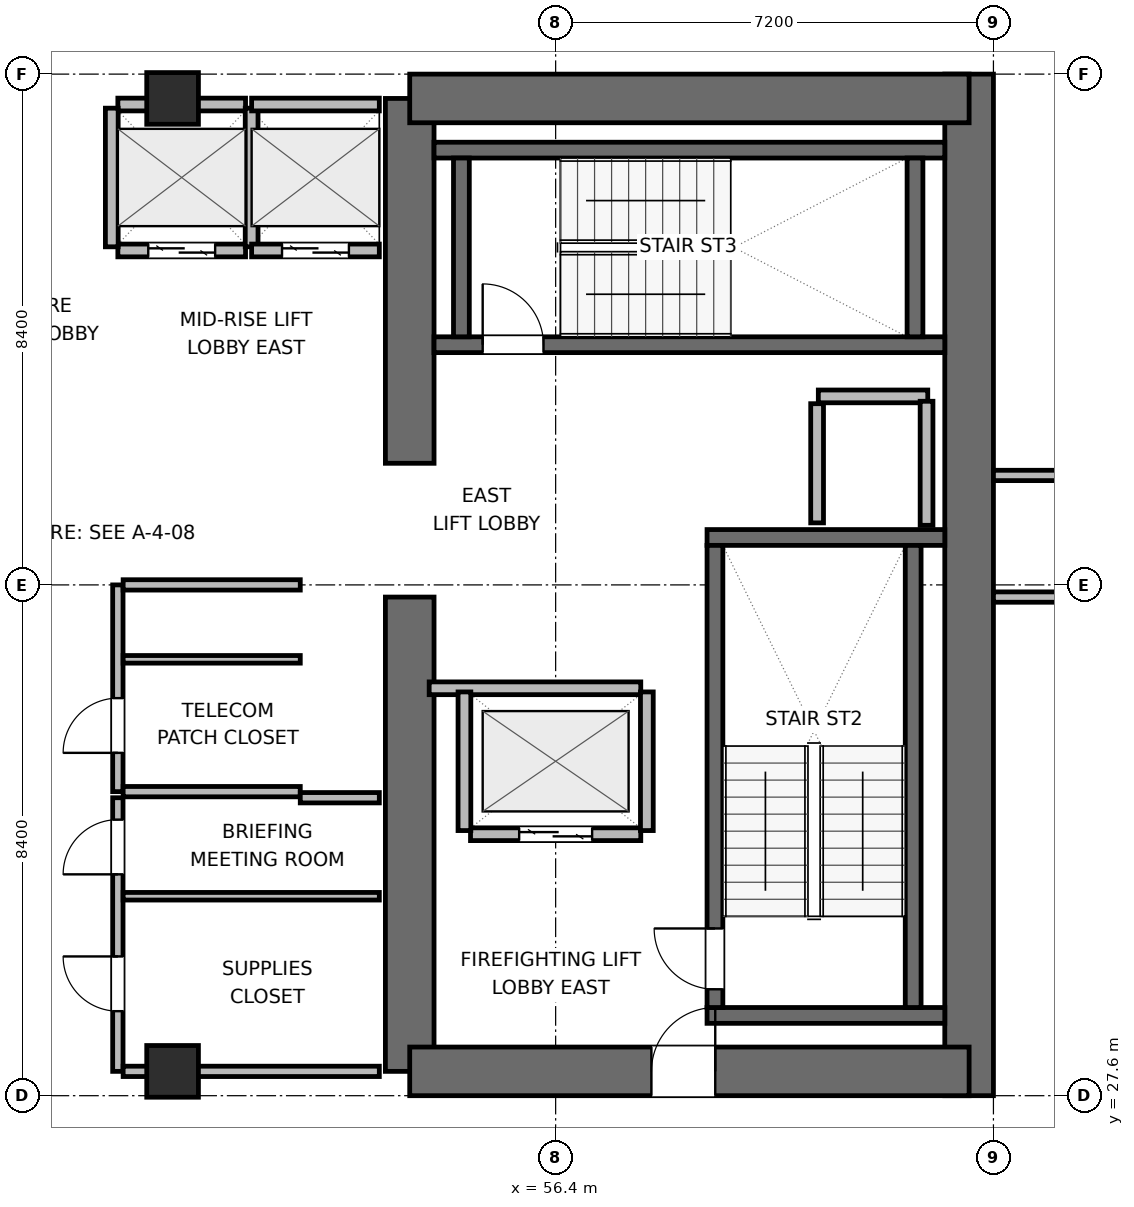
"""IFC4 building model, lengths in metres.
Left out: names, types, materials, properties, quantities, classifications, styles, units other than length and angle.
Written with IfcOpenShell. Run it as: python <this file> out.ifc"""

import sys

from ifc_helpers import new_model, si_unit, direction, frame, frame_2d, origin, origin_2d, place, context, subcontext, project, spatial, rectangle, extrude, element, fill, save


model = new_model("IFC4")
c1 = context("Model", 3, precision=1e-05, world=origin(), true_north=direction((0.0, 1.0)))
c2 = subcontext(c1, "Body", "Model", "MODEL_VIEW")
j1 = project(units=[si_unit("LENGTHUNIT", "METRE"), si_unit("PLANEANGLEUNIT", "RADIAN")], contexts=[c1])
p1 = place(None, origin())
s1 = spatial("IfcSite", under=j1, at=p1, CompositionType="ELEMENT")
p2 = place(p1, origin())
s2 = spatial("IfcBuilding", under=s1, at=p2, CompositionType="ELEMENT")
p3 = place(p2, frame((0.0, 0.0, 162.3)))
s3 = spatial("IfcBuildingStorey", under=s2, at=p3, CompositionType="ELEMENT", Elevation=162.3)
p4 = place(p3, frame((54.0, 28.0, 0.0), z_axis=(0.0, 0.0, 1.0), x_axis=(0.0, 1.0, 0.0)))
e1 = element("IfcWall", 1, at=p4, inside=s3, PredefinedType="SHEAR", context=c2, shape_type="SweptSolid", body=[
    extrude(rectangle(XDim=7.8, YDim=0.8, at=frame_2d((3.9, 0.0))), origin(), (0.0, 0.0, 1.0), 3.9),
])
p5 = place(p3, frame((54.0, 38.0, 0.0), z_axis=(0.0, 0.0, 1.0), x_axis=(0.0, 1.0, 0.0)))
e2 = element("IfcWall", 2, at=p5, inside=s3, PredefinedType="SHEAR", context=c2, shape_type="SweptSolid", body=[
    extrude(rectangle(XDim=6.0, YDim=0.8, at=frame_2d((3.0, 0.0))), origin(), (0.0, 0.0, 1.0), 3.9),
])
p6 = place(p3, frame((63.2, 27.6, 0.0), z_axis=(0.0, 0.0, 1.0), x_axis=(0.0, 1.0, 0.0)))
e3 = element("IfcWall", 3, at=p6, inside=s3, PredefinedType="SHEAR", context=c2, shape_type="SweptSolid", body=[
    extrude(rectangle(XDim=16.8, YDim=0.8, at=frame_2d((8.4, 0.0))), origin(), (0.0, 0.0, 1.0), 3.9),
])
p7 = place(p3, frame((54.0, 28.0, 0.0), z_axis=(0.0, 0.0, 1.0), x_axis=(1.0, 0.0, 0.0)))
e4 = element("IfcWall", 4, at=p7, inside=s3, PredefinedType="SHEAR", context=c2, shape_type="SweptSolid", body=[
    extrude(rectangle(XDim=9.2, YDim=0.8, at=frame_2d((4.6, 0.0))), origin(), (0.0, 0.0, 1.0), 3.9),
])
p8 = place(p7, frame((3.975, 0.0, 0.0)))
e5 = element("IfcOpeningElement", 5, at=p8, cuts=e4, PredefinedType="OPENING", context=c2, shape_type="SweptSolid", body=[
    extrude(rectangle(XDim=1.05, YDim=2.04, at=frame_2d((0.525, 1.02))), frame((0.0, 0.41, 0.0), z_axis=(0.0, -1.0, 0.0), x_axis=(1.0, 0.0, 0.0)), (0.0, 0.0, 1.0), 0.82),
])
p9 = place(p3, frame((54.0, 44.0, 0.0), z_axis=(0.0, 0.0, 1.0), x_axis=(1.0, 0.0, 0.0)))
e6 = element("IfcWall", 6, at=p9, inside=s3, PredefinedType="SHEAR", context=c2, shape_type="SweptSolid", body=[
    extrude(rectangle(XDim=9.2, YDim=0.8, at=frame_2d((4.6, 0.0))), origin(), (0.0, 0.0, 1.0), 3.9),
])
for number, where, z_axis, x_axis in (
    (7, (58.89, 28.92, 0.0), (0.0, 0.0, 1.0), (1.0, 0.0, 0.0)),
    (8, (58.89, 36.78, 0.0), (0.0, 0.0, 1.0), (1.0, 0.0, 0.0)),
):
    element("IfcWall", number, at=place(p3, frame(where, z_axis=z_axis, x_axis=x_axis)), inside=s3, PredefinedType="SHEAR", context=c2, shape_type="SweptSolid", body=[
        extrude(rectangle(XDim=3.91, YDim=0.26, at=frame_2d((1.955, 0.0))), origin(), (0.0, 0.0, 1.0), 3.9),
    ])
p10 = place(p3, frame((59.02, 29.05, 0.0), z_axis=(0.0, 0.0, 1.0), x_axis=(0.0, 1.0, 0.0)))
e9 = element("IfcWall", 9, at=p10, inside=s3, PredefinedType="SHEAR", context=c2, shape_type="SweptSolid", body=[
    extrude(rectangle(XDim=7.6, YDim=0.26, at=frame_2d((3.8, 0.0))), origin(), (0.0, 0.0, 1.0), 3.9),
])
p11 = place(p10, frame((0.3, 0.0, 0.0)))
e10 = element("IfcOpeningElement", 10, at=p11, cuts=e9, PredefinedType="OPENING", context=c2, shape_type="SweptSolid", body=[
    extrude(rectangle(XDim=1.0, YDim=2.04, at=frame_2d((0.5, 1.02))), frame((0.0, 0.14, 0.0), z_axis=(0.0, -1.0, 0.0), x_axis=(1.0, 0.0, 0.0)), (0.0, 0.0, 1.0), 0.28),
])
p12 = place(p3, frame((62.28, 29.05, 0.0), z_axis=(0.0, 0.0, 1.0), x_axis=(0.0, 1.0, 0.0)))
e11 = element("IfcWall", 11, at=p12, inside=s3, PredefinedType="SHEAR", context=c2, shape_type="SweptSolid", body=[
    extrude(rectangle(XDim=7.6, YDim=0.26, at=frame_2d((3.8, 0.0))), origin(), (0.0, 0.0, 1.0), 3.9),
])
p13 = place(p3, frame((54.4, 39.95, 0.0), z_axis=(0.0, 0.0, 1.0), x_axis=(1.0, 0.0, 0.0)))
e12 = element("IfcWall", 12, at=p13, inside=s3, PredefinedType="SHEAR", context=c2, shape_type="SweptSolid", body=[
    extrude(rectangle(XDim=8.4, YDim=0.26, at=frame_2d((4.2, 0.0))), origin(), (0.0, 0.0, 1.0), 3.9),
])
p14 = place(p13, frame((0.8, 0.0, 0.0)))
e13 = element("IfcOpeningElement", 13, at=p14, cuts=e12, PredefinedType="OPENING", context=c2, shape_type="SweptSolid", body=[
    extrude(rectangle(XDim=1.0, YDim=2.04, at=frame_2d((0.5, 1.02))), frame((0.0, 0.14, 0.0), z_axis=(0.0, -1.0, 0.0), x_axis=(1.0, 0.0, 0.0)), (0.0, 0.0, 1.0), 0.28),
])
p15 = place(p3, frame((54.4, 43.15, 0.0), z_axis=(0.0, 0.0, 1.0), x_axis=(1.0, 0.0, 0.0)))
e14 = element("IfcWall", 14, at=p15, inside=s3, PredefinedType="SHEAR", context=c2, shape_type="SweptSolid", body=[
    extrude(rectangle(XDim=8.4, YDim=0.26, at=frame_2d((4.2, 0.0))), origin(), (0.0, 0.0, 1.0), 3.9),
])
for number, where, z_axis, x_axis in (
    (15, (54.85, 40.08, 0.0), (0.0, 0.0, 1.0), (0.0, 1.0, 0.0)),
    (16, (62.31, 40.08, 0.0), (0.0, 0.0, 1.0), (0.0, 1.0, 0.0)),
):
    element("IfcWall", number, at=place(p3, frame(where, z_axis=z_axis, x_axis=x_axis)), inside=s3, PredefinedType="SHEAR", context=c2, shape_type="SweptSolid", body=[
        extrude(rectangle(XDim=2.94, YDim=0.26, at=frame_2d((1.47, 0.0))), origin(), (0.0, 0.0, 1.0), 3.9),
    ])
for number, where, z_axis, x_axis in (
    (17, (50.1, 28.0, 0.0), (0.0, 0.0, 1.0), (1.0, 0.0, 0.0)),
    (18, (50.1, 44.0, 0.0), (0.0, 0.0, 1.0), (1.0, 0.0, 0.0)),
):
    element("IfcColumn", number, at=place(p3, frame(where, z_axis=z_axis, x_axis=x_axis)), inside=s3, PredefinedType="COLUMN", context=c2, shape_type="SweptSolid", body=[
        extrude(rectangle(XDim=0.85, YDim=0.85, at=origin_2d()), origin(), (0.0, 0.0, 1.0), 3.9),
    ])
p16 = place(p3, frame((60.72, 39.1, 0.0), z_axis=(0.0, 0.0, 1.0), x_axis=(1.0, 0.0, 0.0)))
e19 = element("IfcWall", 19, at=p16, inside=s3, PredefinedType="PARTITIONING", context=c2, shape_type="SweptSolid", body=[
    extrude(rectangle(XDim=1.8, YDim=0.21, at=frame_2d((0.9, 0.0))), origin(), (0.0, 0.0, 1.0), 3.68),
])
p17 = place(p3, frame((60.7, 37.02, 0.0), z_axis=(0.0, 0.0, 1.0), x_axis=(0.0, 1.0, 0.0)))
e20 = element("IfcWall", 20, at=p17, inside=s3, PredefinedType="PARTITIONING", context=c2, shape_type="SweptSolid", body=[
    extrude(rectangle(XDim=1.96, YDim=0.21, at=frame_2d((0.98, 0.0))), origin(), (0.0, 0.0, 1.0), 3.68),
])
p18 = place(p3, frame((62.5, 36.98, 0.0), z_axis=(0.0, 0.0, 1.0), x_axis=(0.0, 1.0, 0.0)))
e21 = element("IfcWall", 21, at=p18, inside=s3, PredefinedType="PARTITIONING", context=c2, shape_type="SweptSolid", body=[
    extrude(rectangle(XDim=2.04, YDim=0.21, at=frame_2d((1.02, 0.0))), origin(), (0.0, 0.0, 1.0), 3.68),
])
p19 = place(p3, frame((55.0, 31.9, 0.0), z_axis=(0.0, 0.0, 1.0), x_axis=(1.0, 0.0, 0.0)))
e22 = element("IfcWall", 22, at=p19, inside=s3, PredefinedType="PARTITIONING", context=c2, shape_type="SweptSolid", body=[
    extrude(rectangle(XDim=2.8, YDim=0.21, at=frame_2d((1.4, 0.0))), origin(), (0.0, 0.0, 1.0), 3.68),
])
p20 = place(p19, frame((0.8, 0.0, 0.0)))
e23 = element("IfcOpeningElement", 23, at=p20, cuts=e22, PredefinedType="OPENING", context=c2, shape_type="SweptSolid", body=[
    extrude(rectangle(XDim=1.2, YDim=2.04, at=frame_2d((0.6, 1.02))), frame((0.0, 0.115, 0.0), z_axis=(0.0, -1.0, 0.0), x_axis=(1.0, 0.0, 0.0)), (0.0, 0.0, 1.0), 0.23),
])
p21 = place(p3, frame((54.32, 34.3, 0.0), z_axis=(0.0, 0.0, 1.0), x_axis=(1.0, 0.0, 0.0)))
e24 = element("IfcWall", 24, at=p21, inside=s3, PredefinedType="PARTITIONING", context=c2, shape_type="SweptSolid", body=[
    extrude(rectangle(XDim=3.48, YDim=0.21, at=frame_2d((1.74, 0.0))), origin(), (0.0, 0.0, 1.0), 3.68),
])
for number, where, z_axis, x_axis in (
    (25, (54.9, 31.96, 0.0), (0.0, 0.0, 1.0), (0.0, 1.0, 0.0)),
    (26, (57.9, 31.96, 0.0), (0.0, 0.0, 1.0), (0.0, 1.0, 0.0)),
):
    element("IfcWall", number, at=place(p3, frame(where, z_axis=z_axis, x_axis=x_axis)), inside=s3, PredefinedType="PARTITIONING", context=c2, shape_type="SweptSolid", body=[
        extrude(rectangle(XDim=2.28, YDim=0.21, at=frame_2d((1.14, 0.0))), origin(), (0.0, 0.0, 1.0), 3.68),
    ])
p22 = place(p3, frame((49.2, 41.5, 0.0), z_axis=(0.0, 0.0, 1.0), x_axis=(1.0, 0.0, 0.0)))
e27 = element("IfcWall", 27, at=p22, inside=s3, PredefinedType="PARTITIONING", context=c2, shape_type="SweptSolid", body=[
    extrude(rectangle(XDim=2.1, YDim=0.21, at=frame_2d((1.05, 0.0))), origin(), (0.0, 0.0, 1.0), 3.68),
])
p23 = place(p22, frame((0.5, 0.0, 0.0)))
e28 = element("IfcOpeningElement", 28, at=p23, cuts=e27, PredefinedType="OPENING", context=c2, shape_type="SweptSolid", body=[
    extrude(rectangle(XDim=1.1, YDim=2.04, at=frame_2d((0.55, 1.02))), frame((0.0, 0.115, 0.0), z_axis=(0.0, -1.0, 0.0), x_axis=(1.0, 0.0, 0.0)), (0.0, 0.0, 1.0), 0.23),
])
p24 = place(p3, frame((49.2, 43.9, 0.0), z_axis=(0.0, 0.0, 1.0), x_axis=(1.0, 0.0, 0.0)))
e29 = element("IfcWall", 29, at=p24, inside=s3, PredefinedType="PARTITIONING", context=c2, shape_type="SweptSolid", body=[
    extrude(rectangle(XDim=2.1, YDim=0.21, at=frame_2d((1.05, 0.0))), origin(), (0.0, 0.0, 1.0), 2.765),
])
for number, where, z_axis, x_axis in (
    (30, (49.1, 41.56, 0.0), (0.0, 0.0, 1.0), (0.0, 1.0, 0.0)),
    (31, (51.4, 41.56, 0.0), (0.0, 0.0, 1.0), (0.0, 1.0, 0.0)),
):
    element("IfcWall", number, at=place(p3, frame(where, z_axis=z_axis, x_axis=x_axis)), inside=s3, PredefinedType="PARTITIONING", context=c2, shape_type="SweptSolid", body=[
        extrude(rectangle(XDim=2.28, YDim=0.21, at=frame_2d((1.14, 0.0))), origin(), (0.0, 0.0, 1.0), 3.68),
    ])
p25 = place(p3, frame((51.4, 41.5, 0.0), z_axis=(0.0, 0.0, 1.0), x_axis=(1.0, 0.0, 0.0)))
e32 = element("IfcWall", 32, at=p25, inside=s3, PredefinedType="PARTITIONING", context=c2, shape_type="SweptSolid", body=[
    extrude(rectangle(XDim=2.1, YDim=0.21, at=frame_2d((1.05, 0.0))), origin(), (0.0, 0.0, 1.0), 3.68),
])
p26 = place(p25, frame((0.5, 0.0, 0.0)))
e33 = element("IfcOpeningElement", 33, at=p26, cuts=e32, PredefinedType="OPENING", context=c2, shape_type="SweptSolid", body=[
    extrude(rectangle(XDim=1.1, YDim=2.04, at=frame_2d((0.55, 1.02))), frame((0.0, 0.115, 0.0), z_axis=(0.0, -1.0, 0.0), x_axis=(1.0, 0.0, 0.0)), (0.0, 0.0, 1.0), 0.23),
])
p27 = place(p3, frame((51.4, 43.9, 0.0), z_axis=(0.0, 0.0, 1.0), x_axis=(1.0, 0.0, 0.0)))
e34 = element("IfcWall", 34, at=p27, inside=s3, PredefinedType="PARTITIONING", context=c2, shape_type="SweptSolid", body=[
    extrude(rectangle(XDim=2.1, YDim=0.21, at=frame_2d((1.05, 0.0))), origin(), (0.0, 0.0, 1.0), 2.765),
])
p28 = place(p3, frame((49.2, 32.6, 0.0), z_axis=(0.0, 0.0, 1.0), x_axis=(0.0, 1.0, 0.0)))
e35 = element("IfcWall", 35, at=p28, inside=s3, PredefinedType="PARTITIONING", context=c2, shape_type="SweptSolid", body=[
    extrude(rectangle(XDim=3.4, YDim=0.17, at=frame_2d((1.7, 0.0))), origin(), (0.0, 0.0, 1.0), 3.68),
])
p29 = place(p28, frame((0.638, 0.0, 0.0)))
e36 = element("IfcOpeningElement", 36, at=p29, cuts=e35, PredefinedType="OPENING", context=c2, shape_type="SweptSolid", body=[
    extrude(rectangle(XDim=0.9, YDim=2.02, at=frame_2d((0.45, 1.01))), frame((0.0, 0.095, 0.0), z_axis=(0.0, -1.0, 0.0), x_axis=(1.0, 0.0, 0.0)), (0.0, 0.0, 1.0), 0.19),
])
for number, where, z_axis, x_axis in (
    (37, (49.287, 32.6, 0.0), (0.0, 0.0, 1.0), (1.0, 0.0, 0.0)),
    (38, (49.287, 36.0, 0.0), (0.0, 0.0, 1.0), (1.0, 0.0, 0.0)),
):
    element("IfcWall", number, at=place(p3, frame(where, z_axis=z_axis, x_axis=x_axis)), inside=s3, PredefinedType="PARTITIONING", context=c2, shape_type="SweptSolid", body=[
        extrude(rectangle(XDim=2.913, YDim=0.17, at=frame_2d((1.457, 0.0))), origin(), (0.0, 0.0, 1.0), 3.68),
    ])
p30 = place(p3, frame((49.287, 34.776, 0.0), z_axis=(0.0, 0.0, 1.0), x_axis=(1.0, 0.0, 0.0)))
e39 = element("IfcWall", 39, at=p30, inside=s3, PredefinedType="PARTITIONING", context=c2, shape_type="SweptSolid", body=[
    extrude(rectangle(XDim=2.913, YDim=0.125, at=frame_2d((1.457, 0.0))), origin(), (0.0, 0.0, 1.0), 3.68),
])
p31 = place(p3, frame((49.2, 28.0, 0.0), z_axis=(0.0, 0.0, 1.0), x_axis=(0.0, 1.0, 0.0)))
e40 = element("IfcWall", 40, at=p31, inside=s3, PredefinedType="PARTITIONING", context=c2, shape_type="SweptSolid", body=[
    extrude(rectangle(XDim=4.5, YDim=0.17, at=frame_2d((2.25, 0.0))), origin(), (0.0, 0.0, 1.0), 3.68),
])
p32 = place(p31, frame((0.99, 0.0, 0.0)))
e41 = element("IfcOpeningElement", 41, at=p32, cuts=e40, PredefinedType="OPENING", context=c2, shape_type="SweptSolid", body=[
    extrude(rectangle(XDim=0.9, YDim=2.02, at=frame_2d((0.45, 1.01))), frame((0.0, 0.095, 0.0), z_axis=(0.0, -1.0, 0.0), x_axis=(1.0, 0.0, 0.0)), (0.0, 0.0, 1.0), 0.19),
])
p33 = place(p31, frame((3.24, 0.0, 0.0)))
e42 = element("IfcOpeningElement", 42, at=p33, cuts=e40, PredefinedType="OPENING", context=c2, shape_type="SweptSolid", body=[
    extrude(rectangle(XDim=0.9, YDim=2.02, at=frame_2d((0.45, 1.01))), frame((0.0, 0.095, 0.0), z_axis=(0.0, -1.0, 0.0), x_axis=(1.0, 0.0, 0.0)), (0.0, 0.0, 1.0), 0.19),
])
p34 = place(p3, frame((49.287, 28.0, 0.0), z_axis=(0.0, 0.0, 1.0), x_axis=(1.0, 0.0, 0.0)))
e43 = element("IfcWall", 43, at=p34, inside=s3, PredefinedType="PARTITIONING", context=c2, shape_type="SweptSolid", body=[
    extrude(rectangle(XDim=4.213, YDim=0.17, at=frame_2d((2.106, 0.0))), origin(), (0.0, 0.0, 1.0), 2.765),
])
p35 = place(p3, frame((52.2, 32.5, 0.0), z_axis=(0.0, 0.0, 1.0), x_axis=(1.0, 0.0, 0.0)))
e44 = element("IfcWall", 44, at=p35, inside=s3, PredefinedType="PARTITIONING", context=c2, shape_type="SweptSolid", body=[
    extrude(rectangle(XDim=1.3, YDim=0.17, at=frame_2d((0.65, 0.0))), origin(), (0.0, 0.0, 1.0), 3.68),
])
p36 = place(p3, frame((49.287, 30.88, 0.0), z_axis=(0.0, 0.0, 1.0), x_axis=(1.0, 0.0, 0.0)))
e45 = element("IfcWall", 45, at=p36, inside=s3, PredefinedType="PARTITIONING", context=c2, shape_type="SweptSolid", body=[
    extrude(rectangle(XDim=4.213, YDim=0.125, at=frame_2d((2.106, 0.0))), origin(), (0.0, 0.0, 1.0), 3.68),
])
p37 = place(p3, frame((63.6, 35.8, 0.0), z_axis=(0.0, 0.0, 1.0), x_axis=(1.0, 0.0, 0.0)))
e46 = element("IfcWall", 46, at=p37, inside=s3, PredefinedType="PARTITIONING", context=c2, shape_type="SweptSolid", body=[
    extrude(rectangle(XDim=6.975, YDim=0.17, at=frame_2d((3.487, 0.0))), origin(), (0.0, 0.0, 1.0), 3.043),
])
p38 = place(p37, frame((1.1, 0.0, 0.0)))
e47 = element("IfcOpeningElement", 47, at=p38, cuts=e46, PredefinedType="OPENING", context=c2, shape_type="SweptSolid", body=[
    extrude(rectangle(XDim=0.95, YDim=2.04, at=frame_2d((0.475, 1.02))), frame((0.0, 0.095, 0.0), z_axis=(0.0, -1.0, 0.0), x_axis=(1.0, 0.0, 0.0)), (0.0, 0.0, 1.0), 0.19),
])
p39 = place(p3, frame((63.6, 37.8, 0.0), z_axis=(0.0, 0.0, 1.0), x_axis=(1.0, 0.0, 0.0)))
e48 = element("IfcWall", 48, at=p39, inside=s3, PredefinedType="PARTITIONING", context=c2, shape_type="SweptSolid", body=[
    extrude(rectangle(XDim=4.96, YDim=0.17, at=frame_2d((2.48, 0.0))), origin(), (0.0, 0.0, 1.0), 3.68),
])
p40 = place(p39, frame((1.1, 0.0, 0.0)))
e49 = element("IfcOpeningElement", 49, at=p40, cuts=e48, PredefinedType="OPENING", context=c2, shape_type="SweptSolid", body=[
    extrude(rectangle(XDim=0.95, YDim=2.04, at=frame_2d((0.475, 1.02))), frame((0.0, 0.095, 0.0), z_axis=(0.0, -1.0, 0.0), x_axis=(1.0, 0.0, 0.0)), (0.0, 0.0, 1.0), 0.19),
])
p41 = place(p11, origin())
e50 = element("IfcDoor", 50, at=p41, inside=s3, OperationType="SINGLE_SWING_RIGHT", PredefinedType="DOOR", context=c2, shape_type="SweptSolid", body=[
    extrude(rectangle(XDim=1.0, YDim=2.04, at=frame_2d((0.5, 1.02))), frame((0.0, 0.025, 0.0), z_axis=(0.0, -1.0, 0.0), x_axis=(1.0, 0.0, 0.0)), (0.0, 0.0, 1.0), 0.05),
])
fill(e10, e50)
p42 = place(p14, origin())
e51 = element("IfcDoor", 51, at=p42, inside=s3, OperationType="SINGLE_SWING_LEFT", PredefinedType="DOOR", context=c2, shape_type="SweptSolid", body=[
    extrude(rectangle(XDim=1.0, YDim=2.04, at=frame_2d((0.5, 1.02))), frame((0.0, 0.025, 0.0), z_axis=(0.0, -1.0, 0.0), x_axis=(1.0, 0.0, 0.0)), (0.0, 0.0, 1.0), 0.05),
])
fill(e13, e51)
p43 = place(p20, origin())
e52 = element("IfcDoor", 52, at=p43, inside=s3, OperationType="DOUBLE_DOOR_SLIDING", PredefinedType="DOOR", context=c2, shape_type="SweptSolid", body=[
    extrude(rectangle(XDim=1.2, YDim=2.04, at=frame_2d((0.6, 1.02))), frame((0.0, 0.025, 0.0), z_axis=(0.0, -1.0, 0.0), x_axis=(1.0, 0.0, 0.0)), (0.0, 0.0, 1.0), 0.05),
])
fill(e23, e52)
p44 = place(p23, origin())
e53 = element("IfcDoor", 53, at=p44, inside=s3, OperationType="DOUBLE_DOOR_SLIDING", PredefinedType="DOOR", context=c2, shape_type="SweptSolid", body=[
    extrude(rectangle(XDim=1.1, YDim=2.04, at=frame_2d((0.55, 1.02))), frame((0.0, 0.025, 0.0), z_axis=(0.0, -1.0, 0.0), x_axis=(1.0, 0.0, 0.0)), (0.0, 0.0, 1.0), 0.05),
])
fill(e28, e53)
p45 = place(p26, origin())
e54 = element("IfcDoor", 54, at=p45, inside=s3, OperationType="DOUBLE_DOOR_SLIDING", PredefinedType="DOOR", context=c2, shape_type="SweptSolid", body=[
    extrude(rectangle(XDim=1.1, YDim=2.04, at=frame_2d((0.55, 1.02))), frame((0.0, 0.025, 0.0), z_axis=(0.0, -1.0, 0.0), x_axis=(1.0, 0.0, 0.0)), (0.0, 0.0, 1.0), 0.05),
])
fill(e33, e54)
p46 = place(p8, origin())
e55 = element("IfcDoor", 55, at=p46, inside=s3, OperationType="SINGLE_SWING_RIGHT", PredefinedType="DOOR", context=c2, shape_type="SweptSolid", body=[
    extrude(rectangle(XDim=1.05, YDim=2.04, at=frame_2d((0.525, 1.02))), frame((0.0, 0.025, 0.0), z_axis=(0.0, -1.0, 0.0), x_axis=(1.0, 0.0, 0.0)), (0.0, 0.0, 1.0), 0.05),
])
fill(e5, e55)
p47 = place(p29, origin())
e56 = element("IfcDoor", 56, at=p47, inside=s3, OperationType="SINGLE_SWING_LEFT", PredefinedType="DOOR", context=c2, shape_type="SweptSolid", body=[
    extrude(rectangle(XDim=0.9, YDim=2.02, at=frame_2d((0.45, 1.01))), frame((0.0, 0.025, 0.0), z_axis=(0.0, -1.0, 0.0), x_axis=(1.0, 0.0, 0.0)), (0.0, 0.0, 1.0), 0.05),
])
fill(e36, e56)
p48 = place(p32, origin())
e57 = element("IfcDoor", 57, at=p48, inside=s3, OperationType="SINGLE_SWING_RIGHT", PredefinedType="DOOR", context=c2, shape_type="SweptSolid", body=[
    extrude(rectangle(XDim=0.9, YDim=2.02, at=frame_2d((0.45, 1.01))), frame((0.0, 0.025, 0.0), z_axis=(0.0, -1.0, 0.0), x_axis=(1.0, 0.0, 0.0)), (0.0, 0.0, 1.0), 0.05),
])
fill(e41, e57)
p49 = place(p33, origin())
e58 = element("IfcDoor", 58, at=p49, inside=s3, OperationType="SINGLE_SWING_LEFT", PredefinedType="DOOR", context=c2, shape_type="SweptSolid", body=[
    extrude(rectangle(XDim=0.9, YDim=2.02, at=frame_2d((0.45, 1.01))), frame((0.0, 0.025, 0.0), z_axis=(0.0, -1.0, 0.0), x_axis=(1.0, 0.0, 0.0)), (0.0, 0.0, 1.0), 0.05),
])
fill(e42, e58)
save(model, sys.argv[1])
